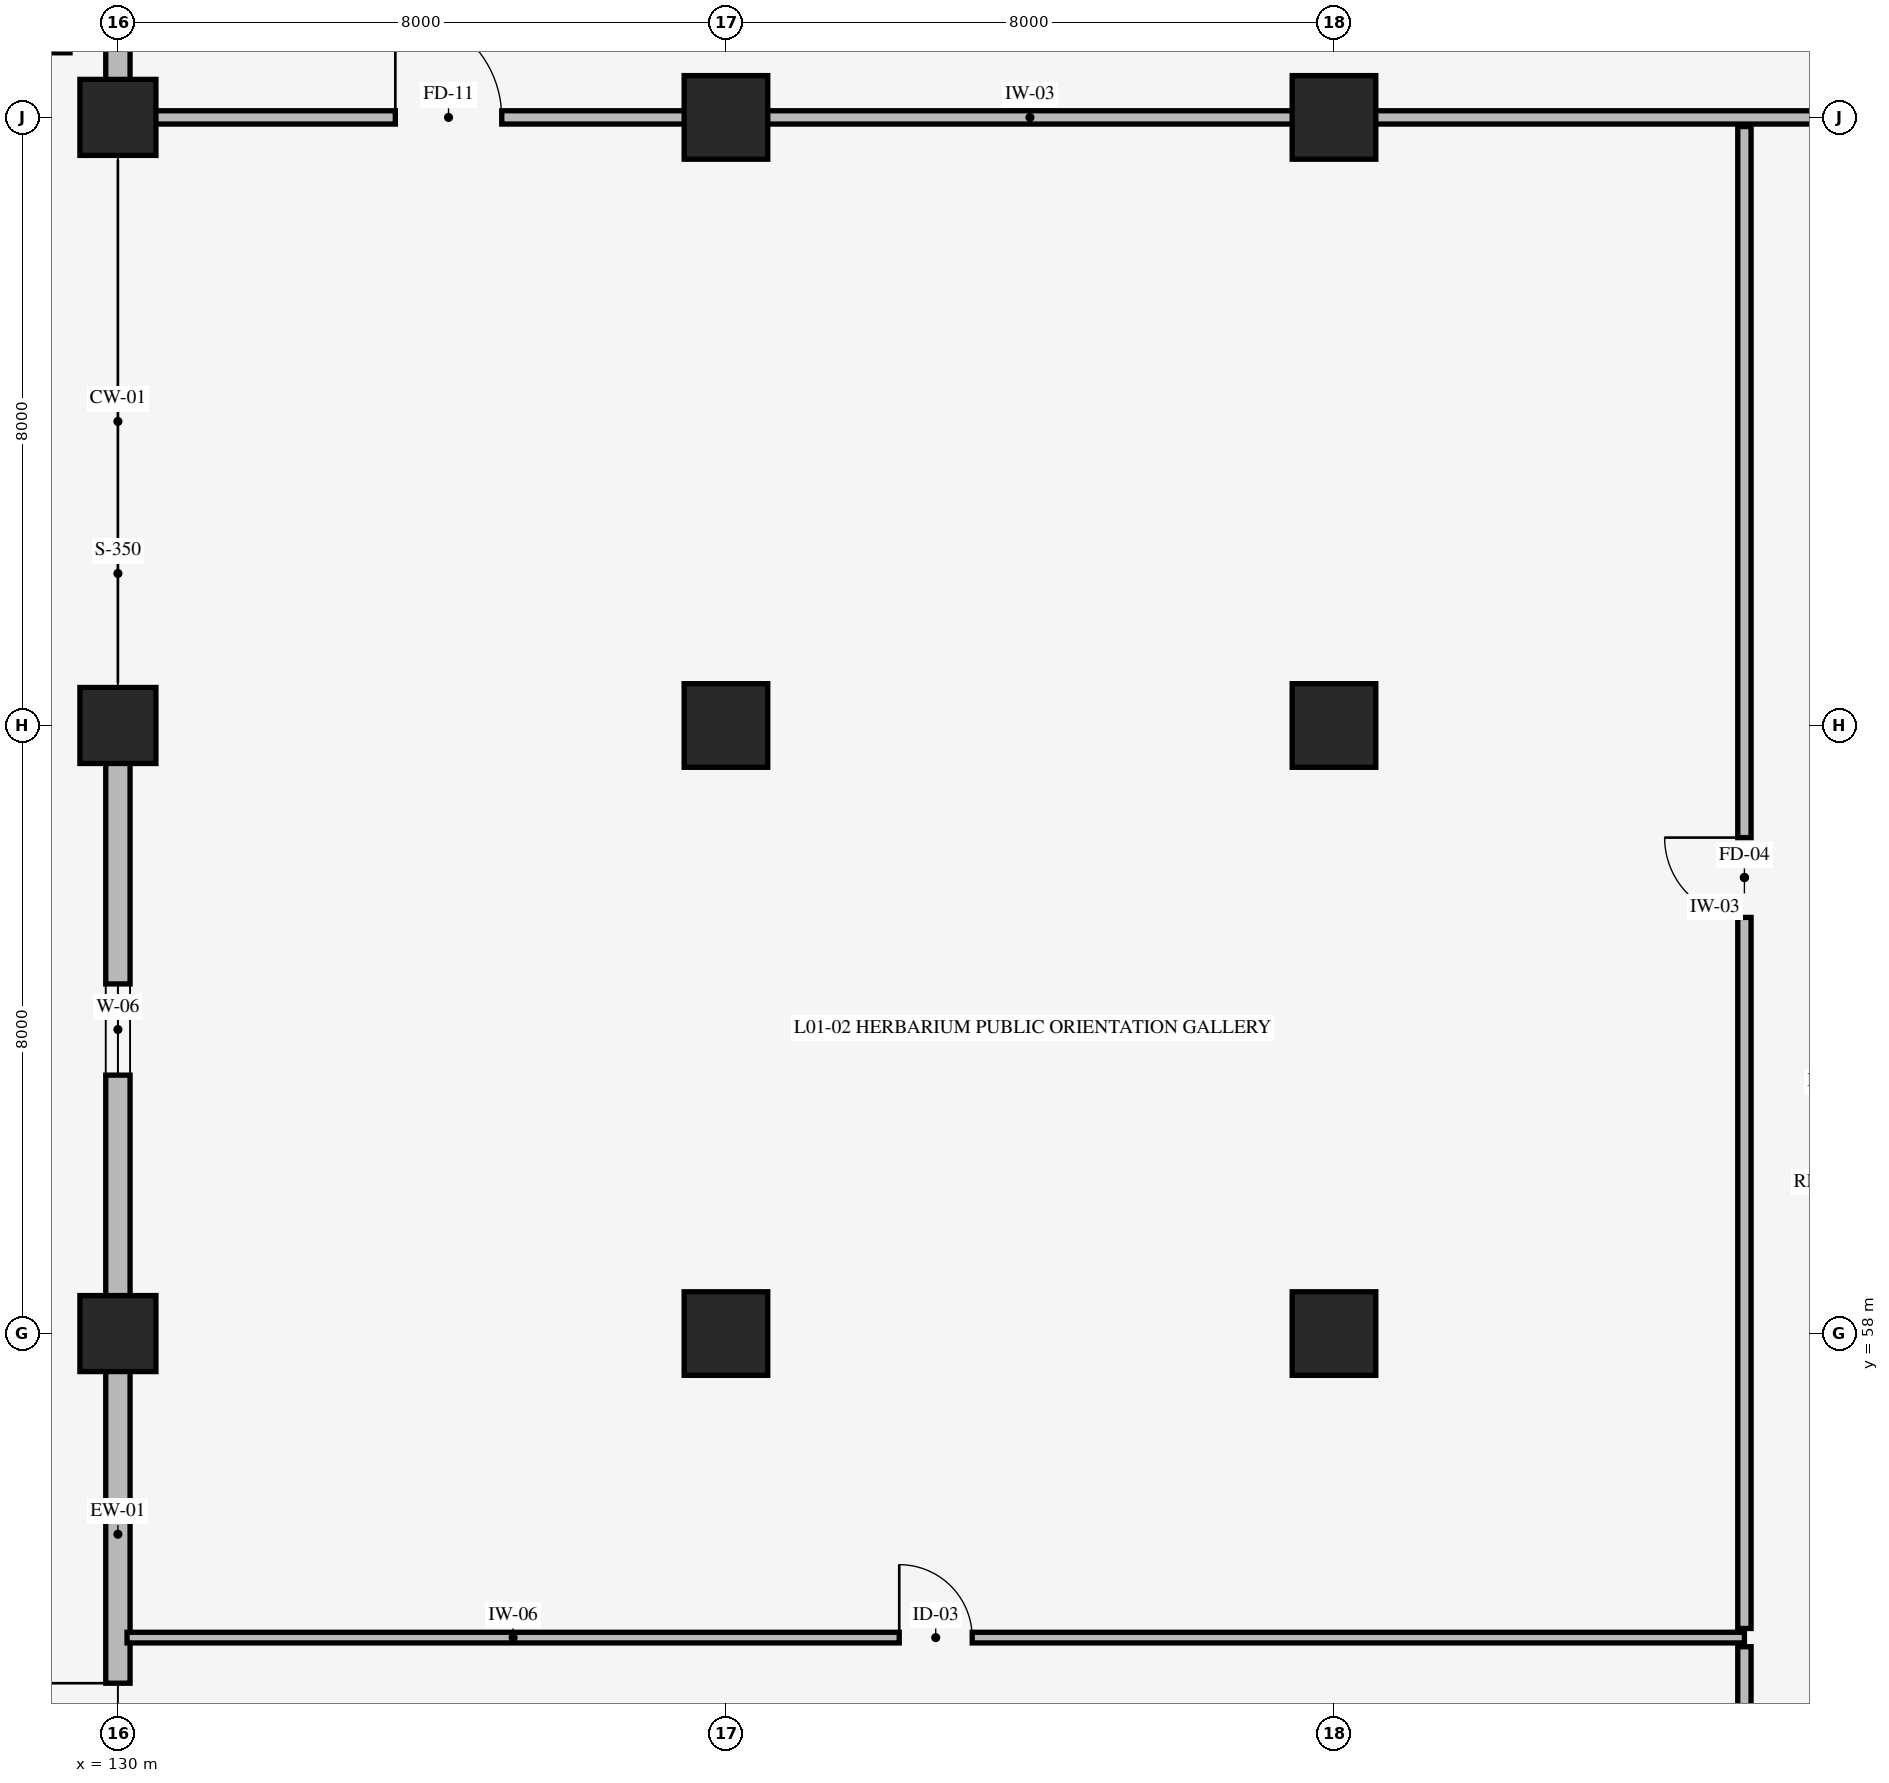
"""IFC4 building model, lengths in metres.
Left out: names, types, materials, properties, quantities, classifications, styles, units other than length and angle.
Written with IfcOpenShell. Run it as: python <this file> out.ifc"""

import sys

from ifc_helpers import new_model, si_unit, direction, frame, frame_2d, origin, origin_2d, place, context, subcontext, project, spatial, rectangle, hollow_rectangle, extrude, element, fill, save


model = new_model("IFC4")
c1 = context("Model", 3, precision=1e-05, world=origin(), true_north=direction((0.0, 1.0)))
c2 = subcontext(c1, "Body", "Model", "MODEL_VIEW")
j1 = project(units=[si_unit("LENGTHUNIT", "METRE"), si_unit("PLANEANGLEUNIT", "RADIAN")], contexts=[c1])
p1 = place(None, origin())
s1 = spatial("IfcSite", under=j1, at=p1, CompositionType="ELEMENT")
p2 = place(p1, origin())
s2 = spatial("IfcBuilding", under=s1, at=p2, CompositionType="ELEMENT")
p3 = place(p2, origin())
s3 = spatial("IfcBuildingStorey", under=s2, at=p3, CompositionType="ELEMENT", Elevation=0.0)
for number, where, z_axis, x_axis in (
    (1, (130.0, 58.0, 0.0), (0.0, 0.0, 1.0), (1.0, 0.0, 0.0)),
    (2, (130.0, 66.0, 0.0), (0.0, 0.0, 1.0), (1.0, 0.0, 0.0)),
    (3, (130.0, 74.0, 0.0), (0.0, 0.0, 1.0), (1.0, 0.0, 0.0)),
):
    element("IfcColumn", number, at=place(p3, frame(where, z_axis=z_axis, x_axis=x_axis)), inside=s3, PredefinedType="COLUMN", context=c2, shape_type="SweptSolid", body=[
        extrude(rectangle(XDim=1.0, YDim=1.0, at=origin_2d()), origin(), (0.0, 0.0, 1.0), 5.4),
    ])
for number, where, z_axis, x_axis in (
    (4, (138.0, 58.0, 0.0), (0.0, 0.0, 1.0), (1.0, 0.0, 0.0)),
    (5, (138.0, 66.0, 0.0), (0.0, 0.0, 1.0), (1.0, 0.0, 0.0)),
    (6, (138.0, 74.0, 0.0), (0.0, 0.0, 1.0), (1.0, 0.0, 0.0)),
    (7, (146.0, 58.0, 0.0), (0.0, 0.0, 1.0), (1.0, 0.0, 0.0)),
    (8, (146.0, 66.0, 0.0), (0.0, 0.0, 1.0), (1.0, 0.0, 0.0)),
    (9, (146.0, 74.0, 0.0), (0.0, 0.0, 1.0), (1.0, 0.0, 0.0)),
):
    element("IfcColumn", number, at=place(p3, frame(where, z_axis=z_axis, x_axis=x_axis)), inside=s3, PredefinedType="COLUMN", context=c2, shape_type="SweptSolid", body=[
        extrude(rectangle(XDim=1.1, YDim=1.1, at=origin_2d()), origin(), (0.0, 0.0, 1.0), 5.4),
    ])
p4 = place(p3, frame((129.22, 75.0, 0.0), z_axis=(0.0, 0.0, 1.0), x_axis=(1.0, 0.0, 0.0)))
e10 = element("IfcColumn", 10, at=p4, inside=s3, PredefinedType="COLUMN", context=c2, shape_type="SweptSolid", body=[
    extrude(hollow_rectangle(XDim=0.3, YDim=0.3, WallThickness=0.01, at=origin_2d()), origin(), (0.0, 0.0, 1.0), 4.34),
])
p5 = place(p3, frame((130.0, 50.0, 0.0), z_axis=(0.0, 0.0, 1.0), x_axis=(0.0, 1.0, 0.0)))
e11 = element("IfcWall", 11, at=p5, inside=s3, PredefinedType="STANDARD", context=c2, shape_type="SweptSolid", body=[
    extrude(rectangle(XDim=8.0, YDim=0.32, at=frame_2d((4.0, 0.0))), origin(), (0.0, 0.0, 1.0), 4.15),
])
p6 = place(p5, frame((1.4, 0.0, 0.0)))
e12 = element("IfcOpeningElement", 12, at=p6, cuts=e11, PredefinedType="OPENING", context=c2, shape_type="SweptSolid", body=[
    extrude(rectangle(XDim=2.0, YDim=2.4, at=frame_2d((1.0, 1.2))), frame((0.0, 0.17, 0.0), z_axis=(0.0, -1.0, 0.0), x_axis=(1.0, 0.0, 0.0)), (0.0, 0.0, 1.0), 0.34),
])
p7 = place(p3, frame((130.0, 58.0, 0.0), z_axis=(0.0, 0.0, 1.0), x_axis=(0.0, 1.0, 0.0)))
e13 = element("IfcWall", 13, at=p7, inside=s3, PredefinedType="STANDARD", context=c2, shape_type="SweptSolid", body=[
    extrude(rectangle(XDim=8.0, YDim=0.32, at=frame_2d((4.0, 0.0))), origin(), (0.0, 0.0, 1.0), 4.15),
])
p8 = place(p7, frame((3.4, 0.0, 0.85)))
e14 = element("IfcOpeningElement", 14, at=p8, cuts=e13, PredefinedType="OPENING", context=c2, shape_type="SweptSolid", body=[
    extrude(rectangle(XDim=1.2, YDim=1.2, at=frame_2d((0.6, 0.6))), frame((0.0, 0.17, 0.0), z_axis=(0.0, -1.0, 0.0), x_axis=(1.0, 0.0, 0.0)), (0.0, 0.0, 1.0), 0.34),
])
p9 = place(p3, frame((130.0, 74.0, 0.0), z_axis=(0.0, 0.0, 1.0), x_axis=(0.0, 1.0, 0.0)))
e15 = element("IfcWall", 15, at=p9, inside=s3, PredefinedType="STANDARD", context=c2, shape_type="SweptSolid", body=[
    extrude(rectangle(XDim=8.0, YDim=0.32, at=frame_2d((4.0, 0.0))), origin(), (0.0, 0.0, 1.0), 4.15),
])
p10 = place(p9, frame((3.0, 0.0, 0.0)))
e16 = element("IfcOpeningElement", 16, at=p10, cuts=e15, PredefinedType="OPENING", context=c2, shape_type="SweptSolid", body=[
    extrude(rectangle(XDim=2.0, YDim=2.4, at=frame_2d((1.0, 1.2))), frame((0.0, 0.17, 0.0), z_axis=(0.0, -1.0, 0.0), x_axis=(1.0, 0.0, 0.0)), (0.0, 0.0, 1.0), 0.34),
])
p11 = place(p3, frame((151.4, 34.12, 0.0), z_axis=(0.0, 0.0, 1.0), x_axis=(0.0, 1.0, 0.0)))
e17 = element("IfcWall", 17, at=p11, inside=s3, PredefinedType="STANDARD", context=c2, shape_type="SweptSolid", body=[
    extrude(rectangle(XDim=19.76, YDim=0.175, at=frame_2d((9.88, 0.0))), origin(), (0.0, 0.0, 1.0), 5.1),
])
p12 = place(p11, frame((9.38, 0.0, 0.0)))
e18 = element("IfcOpeningElement", 18, at=p12, cuts=e17, PredefinedType="OPENING", context=c2, shape_type="SweptSolid", body=[
    extrude(rectangle(XDim=1.0, YDim=2.1, at=frame_2d((0.5, 1.05))), frame((0.0, 0.098, 0.0), z_axis=(0.0, -1.0, 0.0), x_axis=(1.0, 0.0, 0.0)), (0.0, 0.0, 1.0), 0.195),
])
p13 = place(p3, frame((130.12, 54.0, 0.0), z_axis=(0.0, 0.0, 1.0), x_axis=(1.0, 0.0, 0.0)))
e19 = element("IfcWall", 19, at=p13, inside=s3, PredefinedType="STANDARD", context=c2, shape_type="SweptSolid", body=[
    extrude(rectangle(XDim=21.28, YDim=0.14, at=frame_2d((10.64, 0.0))), origin(), (0.0, 0.0, 1.0), 5.1),
])
p14 = place(p13, frame((10.16, 0.0, 0.0)))
e20 = element("IfcOpeningElement", 20, at=p14, cuts=e19, PredefinedType="OPENING", context=c2, shape_type="SweptSolid", body=[
    extrude(rectangle(XDim=0.96, YDim=2.08, at=frame_2d((0.48, 1.04))), frame((0.0, 0.08, 0.0), z_axis=(0.0, -1.0, 0.0), x_axis=(1.0, 0.0, 0.0)), (0.0, 0.0, 1.0), 0.16),
])
p15 = place(p3, frame((151.4, 54.12, 0.0), z_axis=(0.0, 0.0, 1.0), x_axis=(0.0, 1.0, 0.0)))
e21 = element("IfcWall", 21, at=p15, inside=s3, PredefinedType="STANDARD", context=c2, shape_type="SweptSolid", body=[
    extrude(rectangle(XDim=19.76, YDim=0.175, at=frame_2d((9.88, 0.0))), origin(), (0.0, 0.0, 1.0), 5.1),
])
p16 = place(p15, frame((9.355, 0.0, 0.0)))
e22 = element("IfcOpeningElement", 22, at=p16, cuts=e21, PredefinedType="OPENING", context=c2, shape_type="SweptSolid", body=[
    extrude(rectangle(XDim=1.05, YDim=2.1, at=frame_2d((0.525, 1.05))), frame((0.0, 0.098, 0.0), z_axis=(0.0, -1.0, 0.0), x_axis=(1.0, 0.0, 0.0)), (0.0, 0.0, 1.0), 0.195),
])
p17 = place(p3, frame((130.35, 74.0, 0.0), z_axis=(0.0, 0.0, 1.0), x_axis=(1.0, 0.0, 0.0)))
e23 = element("IfcWall", 23, at=p17, inside=s3, PredefinedType="STANDARD", context=c2, shape_type="SweptSolid", body=[
    extrude(rectangle(XDim=31.3, YDim=0.175, at=frame_2d((15.65, 0.0))), origin(), (0.0, 0.0, 1.0), 4.2),
])
p18 = place(p17, frame((3.3, 0.0, 0.0)))
e24 = element("IfcOpeningElement", 24, at=p18, cuts=e23, PredefinedType="OPENING", context=c2, shape_type="SweptSolid", body=[
    extrude(rectangle(XDim=1.4, YDim=2.2, at=frame_2d((0.7, 1.1))), frame((0.0, 0.098, 0.0), z_axis=(0.0, -1.0, 0.0), x_axis=(1.0, 0.0, 0.0)), (0.0, 0.0, 1.0), 0.195),
])
p19 = place(p6, origin())
e25 = element("IfcDoor", 25, at=p19, inside=s3, OperationType="DOUBLE_DOOR_SINGLE_SWING", PredefinedType="DOOR", context=c2, shape_type="SweptSolid", body=[
    extrude(rectangle(XDim=2.0, YDim=2.4, at=frame_2d((1.0, 1.2))), frame((0.0, 0.025, 0.0), z_axis=(0.0, -1.0, 0.0), x_axis=(1.0, 0.0, 0.0)), (0.0, 0.0, 1.0), 0.05),
])
fill(e12, e25)
p20 = place(p8, origin())
e26 = element("IfcWindow", 26, at=p20, inside=s3, PartitioningType="SINGLE_PANEL", PredefinedType="WINDOW", context=c2, shape_type="SweptSolid", body=[
    extrude(rectangle(XDim=1.2, YDim=1.2, at=frame_2d((0.6, 0.6))), frame((0.0, 0.03, 0.0), z_axis=(0.0, -1.0, 0.0), x_axis=(1.0, 0.0, 0.0)), (0.0, 0.0, 1.0), 0.06),
])
fill(e14, e26)
p21 = place(p14, origin())
e27 = element("IfcDoor", 27, at=p21, inside=s3, OperationType="SINGLE_SWING_LEFT", PredefinedType="DOOR", context=c2, shape_type="SweptSolid", body=[
    extrude(rectangle(XDim=0.96, YDim=2.08, at=frame_2d((0.48, 1.04))), frame((0.0, 0.025, 0.0), z_axis=(0.0, -1.0, 0.0), x_axis=(1.0, 0.0, 0.0)), (0.0, 0.0, 1.0), 0.05),
])
fill(e20, e27)
p22 = place(p16, origin())
e28 = element("IfcDoor", 28, at=p22, inside=s3, OperationType="SINGLE_SWING_RIGHT", PredefinedType="DOOR", context=c2, shape_type="SweptSolid", body=[
    extrude(rectangle(XDim=1.05, YDim=2.1, at=frame_2d((0.525, 1.05))), frame((0.0, 0.025, 0.0), z_axis=(0.0, -1.0, 0.0), x_axis=(1.0, 0.0, 0.0)), (0.0, 0.0, 1.0), 0.05),
])
fill(e22, e28)
p23 = place(p18, origin())
e29 = element("IfcDoor", 29, at=p23, inside=s3, OperationType="SINGLE_SWING_LEFT", PredefinedType="DOOR", context=c2, shape_type="SweptSolid", body=[
    extrude(rectangle(XDim=1.4, YDim=2.2, at=frame_2d((0.7, 1.1))), frame((0.0, 0.025, 0.0), z_axis=(0.0, -1.0, 0.0), x_axis=(1.0, 0.0, 0.0)), (0.0, 0.0, 1.0), 0.05),
])
fill(e24, e29)
save(model, sys.argv[1])
